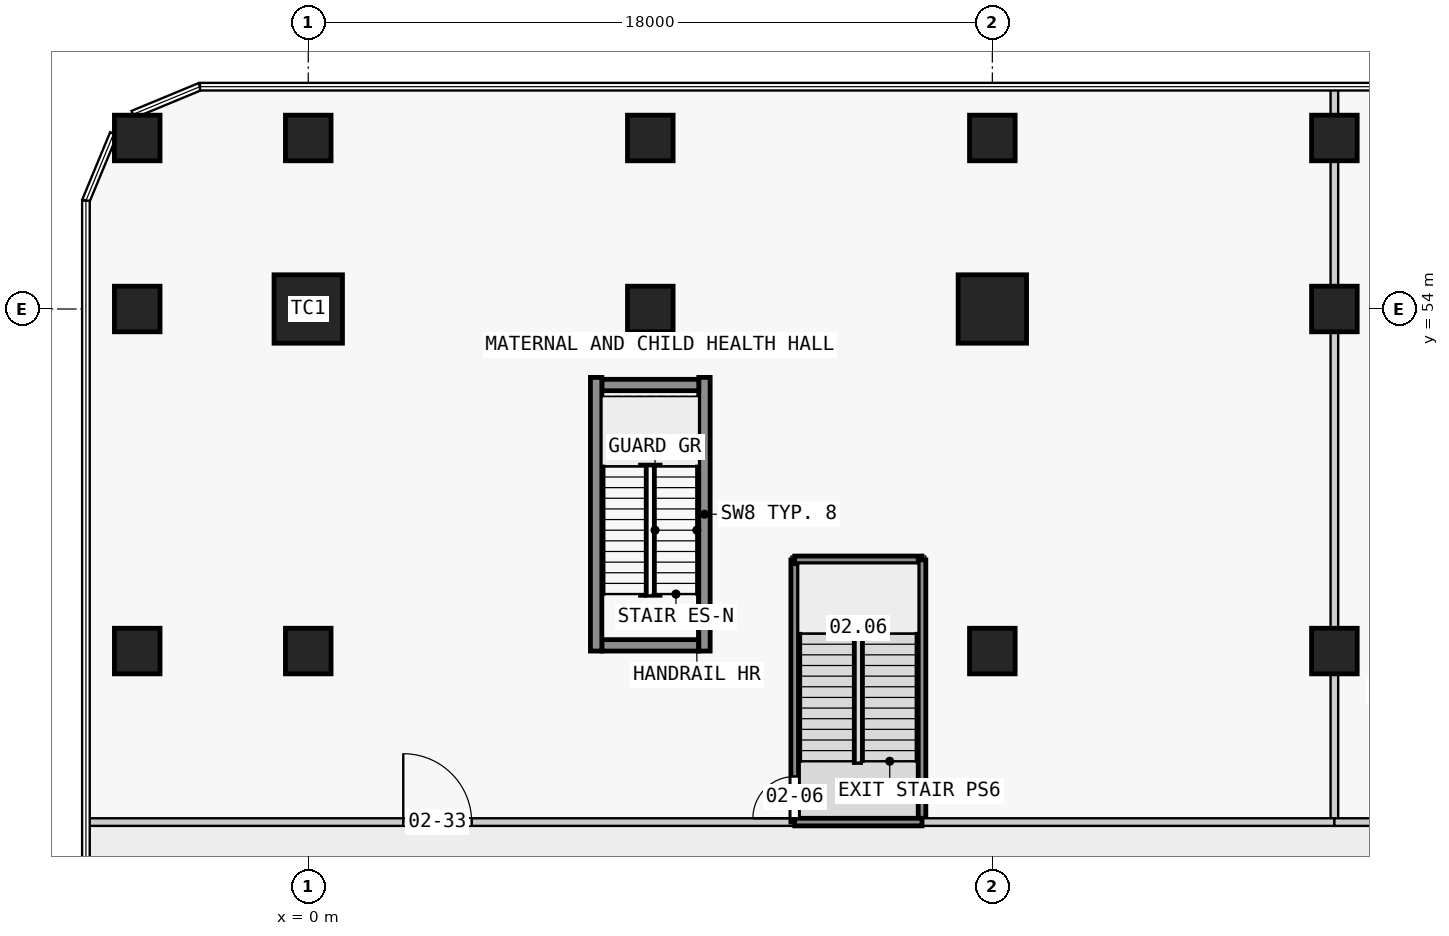
"""IFC4 building model, lengths in metres.
Left out: names, types, materials, properties, quantities, classifications, styles, units other than length and angle.
Written with IfcOpenShell. Run it as: python <this file> out.ifc"""

import sys

from ifc_helpers import new_model, si_unit, direction, frame, frame_2d, origin, origin_2d, place, context, subcontext, project, spatial, rectangle, extrude, element, fill, save


model = new_model("IFC4")
c1 = context("Model", 3, precision=1e-05, world=origin(), true_north=direction((0.0, 1.0)))
c2 = subcontext(c1, "Body", "Model", "MODEL_VIEW")
j1 = project(units=[si_unit("LENGTHUNIT", "METRE"), si_unit("PLANEANGLEUNIT", "RADIAN")], contexts=[c1])
p1 = place(None, origin())
s1 = spatial("IfcSite", under=j1, at=p1, CompositionType="ELEMENT")
p2 = place(p1, origin())
s2 = spatial("IfcBuilding", under=s1, at=p2, CompositionType="ELEMENT")
p3 = place(p2, frame((0.0, 0.0, 12.8)))
s3 = spatial("IfcBuildingStorey", under=s2, at=p3, CompositionType="ELEMENT", Elevation=12.8)
for number, where, z_axis, x_axis in (
    (1, (-4.5, 45.0, 0.0), (0.0, 0.0, 1.0), (1.0, 0.0, 0.0)),
    (2, (-4.5, 54.0, 0.0), (0.0, 0.0, 1.0), (1.0, 0.0, 0.0)),
    (3, (-4.5, 58.5, 0.0), (0.0, 0.0, 1.0), (1.0, 0.0, 0.0)),
    (4, (0.0, 45.0, 0.0), (0.0, 0.0, 1.0), (1.0, 0.0, 0.0)),
):
    element("IfcColumn", number, at=place(p3, frame(where, z_axis=z_axis, x_axis=x_axis)), inside=s3, PredefinedType="COLUMN", context=c2, shape_type="SweptSolid", body=[
        extrude(rectangle(XDim=1.2, YDim=1.2, at=origin_2d()), origin(), (0.0, 0.0, 1.0), 4.5),
    ])
p4 = place(p3, frame((0.0, 54.0, 0.0), z_axis=(0.0, 0.0, 1.0), x_axis=(1.0, 0.0, 0.0)))
e5 = element("IfcColumn", 5, at=p4, inside=s3, PredefinedType="COLUMN", context=c2, shape_type="SweptSolid", body=[
    extrude(rectangle(XDim=1.8, YDim=1.8, at=origin_2d()), origin(), (0.0, 0.0, 1.0), 4.5),
])
for number, where, z_axis, x_axis in (
    (6, (0.0, 58.5, 0.0), (0.0, 0.0, 1.0), (1.0, 0.0, 0.0)),
    (7, (9.0, 54.0, 0.0), (0.0, 0.0, 1.0), (1.0, 0.0, 0.0)),
    (8, (9.0, 58.5, 0.0), (0.0, 0.0, 1.0), (1.0, 0.0, 0.0)),
    (9, (18.0, 45.0, 0.0), (0.0, 0.0, 1.0), (1.0, 0.0, 0.0)),
):
    element("IfcColumn", number, at=place(p3, frame(where, z_axis=z_axis, x_axis=x_axis)), inside=s3, PredefinedType="COLUMN", context=c2, shape_type="SweptSolid", body=[
        extrude(rectangle(XDim=1.2, YDim=1.2, at=origin_2d()), origin(), (0.0, 0.0, 1.0), 4.5),
    ])
p5 = place(p3, frame((18.0, 54.0, 0.0), z_axis=(0.0, 0.0, 1.0), x_axis=(1.0, 0.0, 0.0)))
e10 = element("IfcColumn", 10, at=p5, inside=s3, PredefinedType="COLUMN", context=c2, shape_type="SweptSolid", body=[
    extrude(rectangle(XDim=1.8, YDim=1.8, at=origin_2d()), origin(), (0.0, 0.0, 1.0), 4.5),
])
for number, where, z_axis, x_axis in (
    (11, (18.0, 58.5, 0.0), (0.0, 0.0, 1.0), (1.0, 0.0, 0.0)),
    (12, (27.0, 45.0, 0.0), (0.0, 0.0, 1.0), (1.0, 0.0, 0.0)),
    (13, (27.0, 54.0, 0.0), (0.0, 0.0, 1.0), (1.0, 0.0, 0.0)),
    (14, (27.0, 58.5, 0.0), (0.0, 0.0, 1.0), (1.0, 0.0, 0.0)),
):
    element("IfcColumn", number, at=place(p3, frame(where, z_axis=z_axis, x_axis=x_axis)), inside=s3, PredefinedType="COLUMN", context=c2, shape_type="SweptSolid", body=[
        extrude(rectangle(XDim=1.2, YDim=1.2, at=origin_2d()), origin(), (0.0, 0.0, 1.0), 4.5),
    ])
for number, where, z_axis, x_axis in (
    (15, (7.725, 45.15, 0.0), (0.0, 0.0, 1.0), (1.0, 0.0, 0.0)),
    (16, (7.725, 52.0, 0.0), (0.0, 0.0, 1.0), (1.0, 0.0, 0.0)),
):
    element("IfcWall", number, at=place(p3, frame(where, z_axis=z_axis, x_axis=x_axis)), inside=s3, PredefinedType="SHEAR", context=c2, shape_type="SweptSolid", body=[
        extrude(rectangle(XDim=2.55, YDim=0.3, at=frame_2d((1.275, 0.0))), origin(), (0.0, 0.0, 1.0), 4.5),
    ])
for number, where, z_axis, x_axis in (
    (17, (7.575, 45.0, 0.0), (0.0, 0.0, 1.0), (0.0, 1.0, 0.0)),
    (18, (10.425, 45.0, 0.0), (0.0, 0.0, 1.0), (0.0, 1.0, 0.0)),
):
    element("IfcWall", number, at=place(p3, frame(where, z_axis=z_axis, x_axis=x_axis)), inside=s3, PredefinedType="SHEAR", context=c2, shape_type="SweptSolid", body=[
        extrude(rectangle(XDim=7.2, YDim=0.3, at=frame_2d((3.6, 0.0))), origin(), (0.0, 0.0, 1.0), 4.5),
    ])
p6 = place(p3, frame((27.0, 59.85, 0.0), z_axis=(0.0, 0.0, 1.0), x_axis=(0.0, -1.0, 0.0)))
e19 = element("IfcWall", 19, at=p6, inside=s3, PredefinedType="PARTITIONING", context=c2, shape_type="SweptSolid", body=[
    extrude(rectangle(XDim=0.75, YDim=0.2, at=frame_2d((0.375, 0.0))), origin(), (0.0, 0.0, 1.0), 4.15),
])
p7 = place(p3, frame((27.0, 57.9, 0.0), z_axis=(0.0, 0.0, 1.0), x_axis=(0.0, -1.0, 0.0)))
e20 = element("IfcWall", 20, at=p7, inside=s3, PredefinedType="PARTITIONING", context=c2, shape_type="SweptSolid", body=[
    extrude(rectangle(XDim=3.3, YDim=0.2, at=frame_2d((1.65, 0.0))), origin(), (0.0, 0.0, 1.0), 3.45),
])
p8 = place(p3, frame((27.0, 53.4, 0.0), z_axis=(0.0, 0.0, 1.0), x_axis=(0.0, -1.0, 0.0)))
e21 = element("IfcWall", 21, at=p8, inside=s3, PredefinedType="PARTITIONING", context=c2, shape_type="SweptSolid", body=[
    extrude(rectangle(XDim=7.8, YDim=0.2, at=frame_2d((3.9, 0.0))), origin(), (0.0, 0.0, 1.0), 3.45),
])
p9 = place(p3, frame((27.0, 44.4, 0.0), z_axis=(0.0, 0.0, 1.0), x_axis=(0.0, -1.0, 0.0)))
e22 = element("IfcWall", 22, at=p9, inside=s3, PredefinedType="PARTITIONING", context=c2, shape_type="SweptSolid", body=[
    extrude(rectangle(XDim=3.9, YDim=0.2, at=frame_2d((1.95, 0.0))), origin(), (0.0, 0.0, 1.0), 3.45),
])
p10 = place(p3, frame((-5.85, 40.5, 0.0), z_axis=(0.0, 0.0, 1.0), x_axis=(1.0, 0.0, 0.0)))
e23 = element("IfcWall", 23, at=p10, inside=s3, PredefinedType="PARTITIONING", context=c2, shape_type="SweptSolid", body=[
    extrude(rectangle(XDim=18.65, YDim=0.2, at=frame_2d((9.325, 0.0))), origin(), (0.0, 0.0, 1.0), 3.45),
])
p11 = place(p10, frame((8.35, 0.0, 0.0)))
e24 = element("IfcOpeningElement", 24, at=p11, cuts=e23, PredefinedType="OPENING", context=c2, shape_type="SweptSolid", body=[
    extrude(rectangle(XDim=1.8, YDim=2.1, at=frame_2d((0.9, 1.05))), frame((0.0, 0.11, 0.0), z_axis=(0.0, -1.0, 0.0), x_axis=(1.0, 0.0, 0.0)), (0.0, 0.0, 1.0), 0.22),
])
p12 = place(p3, frame((12.8, 40.5, 0.0), z_axis=(0.0, 0.0, 1.0), x_axis=(0.0, 1.0, 0.0)))
e25 = element("IfcWall", 25, at=p12, inside=s3, PredefinedType="PARTITIONING", context=c2, shape_type="SweptSolid", body=[
    extrude(rectangle(XDim=6.9, YDim=0.2, at=frame_2d((3.45, 0.0))), origin(), (0.0, 0.0, 1.0), 4.15),
])
p13 = place(p12, frame((0.1, 0.0, 0.0)))
e26 = element("IfcOpeningElement", 26, at=p13, cuts=e25, PredefinedType="OPENING", context=c2, shape_type="SweptSolid", body=[
    extrude(rectangle(XDim=1.1, YDim=2.1, at=frame_2d((0.55, 1.05))), frame((0.0, 0.11, 0.0), z_axis=(0.0, -1.0, 0.0), x_axis=(1.0, 0.0, 0.0)), (0.0, 0.0, 1.0), 0.22),
])
p14 = place(p3, frame((12.8, 47.4, 0.0), z_axis=(0.0, 0.0, 1.0), x_axis=(1.0, 0.0, 0.0)))
e27 = element("IfcWall", 27, at=p14, inside=s3, PredefinedType="PARTITIONING", context=c2, shape_type="SweptSolid", body=[
    extrude(rectangle(XDim=3.35, YDim=0.2, at=frame_2d((1.675, 0.0))), origin(), (0.0, 0.0, 1.0), 4.15),
])
p15 = place(p3, frame((16.15, 47.4, 0.0), z_axis=(0.0, 0.0, 1.0), x_axis=(0.0, -1.0, 0.0)))
e28 = element("IfcWall", 28, at=p15, inside=s3, PredefinedType="PARTITIONING", context=c2, shape_type="SweptSolid", body=[
    extrude(rectangle(XDim=6.9, YDim=0.2, at=frame_2d((3.45, 0.0))), origin(), (0.0, 0.0, 1.0), 4.15),
])
p16 = place(p3, frame((16.15, 40.5, 0.0), z_axis=(0.0, 0.0, 1.0), x_axis=(1.0, 0.0, 0.0)))
e29 = element("IfcWall", 29, at=p16, inside=s3, PredefinedType="PARTITIONING", context=c2, shape_type="SweptSolid", body=[
    extrude(rectangle(XDim=10.85, YDim=0.2, at=frame_2d((5.425, 0.0))), origin(), (0.0, 0.0, 1.0), 3.45),
])
p17 = place(p3, frame((27.0, 40.5, 0.0), z_axis=(0.0, 0.0, 1.0), x_axis=(1.0, 0.0, 0.0)))
e30 = element("IfcWall", 30, at=p17, inside=s3, PredefinedType="PARTITIONING", context=c2, shape_type="SweptSolid", body=[
    extrude(rectangle(XDim=3.6, YDim=0.2, at=frame_2d((1.8, 0.0))), origin(), (0.0, 0.0, 1.0), 3.45),
])
p18 = place(p3, frame((16.15, 40.5, 0.0), z_axis=(0.0, 0.0, 1.0), x_axis=(-1.0, 0.0, 0.0)))
e31 = element("IfcWall", 31, at=p18, inside=s3, PredefinedType="PARTITIONING", context=c2, shape_type="SweptSolid", body=[
    extrude(rectangle(XDim=3.35, YDim=0.2, at=frame_2d((1.675, 0.0))), origin(), (0.0, 0.0, 1.0), 4.15),
])
p19 = place(p13, origin())
e32 = element("IfcDoor", 32, at=p19, inside=s3, OperationType="SINGLE_SWING_LEFT", PredefinedType="DOOR", context=c2, shape_type="SweptSolid", body=[
    extrude(rectangle(XDim=1.1, YDim=2.1, at=frame_2d((0.55, 1.05))), frame((0.0, 0.025, 0.0), z_axis=(0.0, -1.0, 0.0), x_axis=(1.0, 0.0, 0.0)), (0.0, 0.0, 1.0), 0.05),
])
fill(e26, e32)
p20 = place(p11, origin())
e33 = element("IfcDoor", 33, at=p20, inside=s3, OperationType="DOUBLE_DOOR_SINGLE_SWING", PredefinedType="DOOR", context=c2, shape_type="SweptSolid", body=[
    extrude(rectangle(XDim=1.8, YDim=2.1, at=frame_2d((0.9, 1.05))), frame((0.0, 0.025, 0.0), z_axis=(0.0, -1.0, 0.0), x_axis=(1.0, 0.0, 0.0)), (0.0, 0.0, 1.0), 0.05),
])
fill(e24, e33)
save(model, sys.argv[1])
